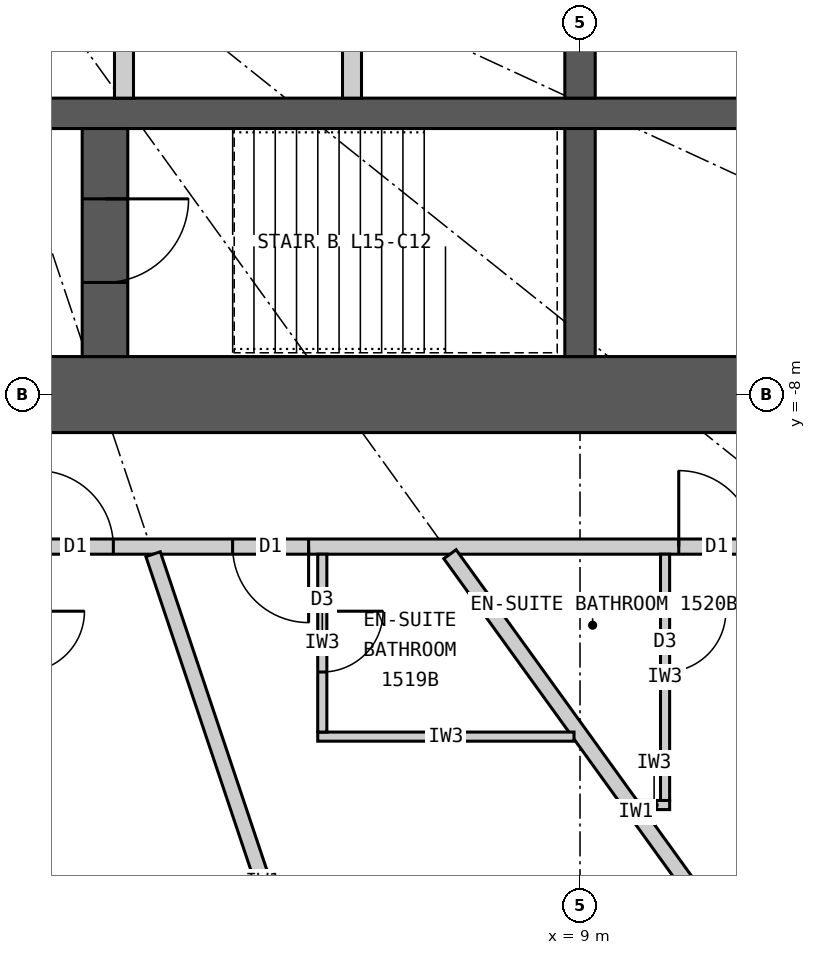
"""IFC4 building model, lengths in metres.
Left out: names, types, materials, properties, quantities, classifications, styles, units other than length and angle.
Written with IfcOpenShell. Run it as: python <this file> out.ifc"""

import sys

from ifc_helpers import new_model, si_unit, direction, frame, frame_2d, origin, place, context, subcontext, project, spatial, rectangle, extrude, element, fill, save


model = new_model("IFC4")
c1 = context("Model", 3, precision=1e-05, world=origin(), true_north=direction((0.0, 1.0)))
c2 = subcontext(c1, "Body", "Model", "MODEL_VIEW")
j1 = project(units=[si_unit("LENGTHUNIT", "METRE"), si_unit("PLANEANGLEUNIT", "RADIAN")], contexts=[c1])
p1 = place(None, origin())
s1 = spatial("IfcSite", under=j1, at=p1, CompositionType="ELEMENT")
p2 = place(p1, origin())
s2 = spatial("IfcBuilding", under=s1, at=p2, CompositionType="ELEMENT")
p3 = place(p2, frame((0.0, 0.0, 63.9)))
s3 = spatial("IfcBuildingStorey", under=s2, at=p3, CompositionType="ELEMENT", Elevation=63.9)
p4 = place(p3, frame((12.5, -8.0, 0.0), z_axis=(0.0, 0.0, 1.0), x_axis=(-1.0, 0.0, 0.0)))
e1 = element("IfcWall", 1, at=p4, inside=s3, PredefinedType="SHEAR", context=c2, shape_type="SweptSolid", body=[
    extrude(rectangle(XDim=25.0, YDim=1.0, at=frame_2d((12.5, 0.0))), origin(), (0.0, 0.0, 1.0), 3.3),
])
p5 = place(p4, frame((11.2, 0.0, 0.0)))
e2 = element("IfcOpeningElement", 2, at=p5, cuts=e1, PredefinedType="OPENING", context=c2, shape_type="SweptSolid", body=[
    extrude(rectangle(XDim=1.2, YDim=2.2, at=frame_2d((0.6, 1.1))), frame((0.0, 0.51, 0.0), z_axis=(0.0, -1.0, 0.0), x_axis=(1.0, 0.0, 0.0)), (0.0, 0.0, 1.0), 1.02),
])
p6 = place(p4, frame((18.8, 0.0, 0.0)))
e3 = element("IfcOpeningElement", 3, at=p6, cuts=e1, PredefinedType="OPENING", context=c2, shape_type="SweptSolid", body=[
    extrude(rectangle(XDim=0.9, YDim=2.2, at=frame_2d((0.45, 1.1))), frame((0.0, 0.51, 0.0), z_axis=(0.0, -1.0, 0.0), x_axis=(1.0, 0.0, 0.0)), (0.0, 0.0, 1.0), 1.02),
])
p7 = place(p3, frame((-11.5, -4.3, 0.0), z_axis=(0.0, 0.0, 1.0), x_axis=(1.0, 0.0, 0.0)))
e4 = element("IfcWall", 4, at=p7, inside=s3, PredefinedType="SHEAR", context=c2, shape_type="SweptSolid", body=[
    extrude(rectangle(XDim=23.0, YDim=0.4, at=frame_2d((11.5, 0.0))), origin(), (0.0, 0.0, 1.0), 3.3),
])
p8 = place(p3, frame((9.0, -4.1, 0.0), z_axis=(0.0, 0.0, 1.0), x_axis=(0.0, 1.0, 0.0)))
e5 = element("IfcWall", 5, at=p8, inside=s3, PredefinedType="SHEAR", context=c2, shape_type="SweptSolid", body=[
    extrude(rectangle(XDim=2.35, YDim=0.4, at=frame_2d((1.175, 0.0))), origin(), (0.0, 0.0, 1.0), 3.3),
])
p9 = place(p3, frame((9.0, -7.5, 0.0), z_axis=(0.0, 0.0, 1.0), x_axis=(0.0, 1.0, 0.0)))
e6 = element("IfcWall", 6, at=p9, inside=s3, PredefinedType="SHEAR", context=c2, shape_type="SweptSolid", body=[
    extrude(rectangle(XDim=3.0, YDim=0.4, at=frame_2d((1.5, 0.0))), origin(), (0.0, 0.0, 1.0), 3.3),
])
p10 = place(p3, frame((2.75, -7.5, 0.0), z_axis=(0.0, 0.0, 1.0), x_axis=(0.0, 1.0, 0.0)))
e7 = element("IfcWall", 7, at=p10, inside=s3, PredefinedType="SHEAR", context=c2, shape_type="SweptSolid", body=[
    extrude(rectangle(XDim=3.0, YDim=0.6, at=frame_2d((1.5, 0.0))), origin(), (0.0, 0.0, 1.0), 3.3),
])
p11 = place(p10, frame((0.975, 0.0, 0.0)))
e8 = element("IfcOpeningElement", 8, at=p11, cuts=e7, PredefinedType="OPENING", context=c2, shape_type="SweptSolid", body=[
    extrude(rectangle(XDim=1.1, YDim=2.2, at=frame_2d((0.55, 1.1))), frame((0.0, 0.31, 0.0), z_axis=(0.0, -1.0, 0.0), x_axis=(1.0, 0.0, 0.0)), (0.0, 0.0, 1.0), 0.62),
])
for number, where, z_axis, x_axis in (
    (9, (3.0, -4.1, 0.0), (0.0, 0.0, 1.0), (0.0, 1.0, 0.0)),
    (10, (6.0, -4.1, 0.0), (0.0, 0.0, 1.0), (0.0, 1.0, 0.0)),
):
    element("IfcWall", number, at=place(p3, frame(where, z_axis=z_axis, x_axis=x_axis)), inside=s3, PredefinedType="PARTITIONING", context=c2, shape_type="SweptSolid", body=[
        extrude(rectangle(XDim=2.35, YDim=0.25, at=frame_2d((1.175, 0.0))), origin(), (0.0, 0.0, 1.0), 3.3),
    ])
p12 = place(p3, frame((14.1, -10.0, 0.0), z_axis=(0.0, 0.0, 1.0), x_axis=(-1.0, 0.0, 0.0)))
e11 = element("IfcWall", 11, at=p12, inside=s3, PredefinedType="PARTITIONING", context=c2, shape_type="SweptSolid", body=[
    extrude(rectangle(XDim=28.2, YDim=0.2, at=frame_2d((14.1, 0.0))), origin(), (0.0, 0.0, 1.0), 3.12),
])
p13 = place(p12, frame((23.865, 0.0, 0.0)))
e12 = element("IfcOpeningElement", 12, at=p13, cuts=e11, PredefinedType="OPENING", context=c2, shape_type="SweptSolid", body=[
    extrude(rectangle(XDim=1.0, YDim=2.2, at=frame_2d((0.5, 1.1))), frame((0.0, 0.11, 0.0), z_axis=(0.0, -1.0, 0.0), x_axis=(1.0, 0.0, 0.0)), (0.0, 0.0, 1.0), 0.22),
])
p14 = place(p12, frame((18.529, 0.0, 0.0)))
e13 = element("IfcOpeningElement", 13, at=p14, cuts=e11, PredefinedType="OPENING", context=c2, shape_type="SweptSolid", body=[
    extrude(rectangle(XDim=1.0, YDim=2.2, at=frame_2d((0.5, 1.1))), frame((0.0, 0.11, 0.0), z_axis=(0.0, -1.0, 0.0), x_axis=(1.0, 0.0, 0.0)), (0.0, 0.0, 1.0), 0.22),
])
p15 = place(p12, frame((14.623, 0.0, 0.0)))
e14 = element("IfcOpeningElement", 14, at=p15, cuts=e11, PredefinedType="OPENING", context=c2, shape_type="SweptSolid", body=[
    extrude(rectangle(XDim=1.0, YDim=2.2, at=frame_2d((0.5, 1.1))), frame((0.0, 0.11, 0.0), z_axis=(0.0, -1.0, 0.0), x_axis=(1.0, 0.0, 0.0)), (0.0, 0.0, 1.0), 0.22),
])
p16 = place(p12, frame((11.24, 0.0, 0.0)))
e15 = element("IfcOpeningElement", 15, at=p16, cuts=e11, PredefinedType="OPENING", context=c2, shape_type="SweptSolid", body=[
    extrude(rectangle(XDim=1.0, YDim=2.2, at=frame_2d((0.5, 1.1))), frame((0.0, 0.11, 0.0), z_axis=(0.0, -1.0, 0.0), x_axis=(1.0, 0.0, 0.0)), (0.0, 0.0, 1.0), 0.22),
])
p17 = place(p12, frame((8.671, 0.0, 0.0)))
e16 = element("IfcOpeningElement", 16, at=p17, cuts=e11, PredefinedType="OPENING", context=c2, shape_type="SweptSolid", body=[
    extrude(rectangle(XDim=1.0, YDim=2.2, at=frame_2d((0.5, 1.1))), frame((0.0, 0.11, 0.0), z_axis=(0.0, -1.0, 0.0), x_axis=(1.0, 0.0, 0.0)), (0.0, 0.0, 1.0), 0.22),
])
p18 = place(p12, frame((2.801, 0.0, 0.0)))
e17 = element("IfcOpeningElement", 17, at=p18, cuts=e11, PredefinedType="OPENING", context=c2, shape_type="SweptSolid", body=[
    extrude(rectangle(XDim=1.0, YDim=2.2, at=frame_2d((0.5, 1.1))), frame((0.0, 0.11, 0.0), z_axis=(0.0, -1.0, 0.0), x_axis=(1.0, 0.0, 0.0)), (0.0, 0.0, 1.0), 0.22),
])
p19 = place(p3, frame((3.383, -10.1, 0.0), z_axis=(0.0, 0.0, 1.0), x_axis=(0.31759592231, -0.948226149256, 0.0)))
e18 = element("IfcWall", 18, at=p19, inside=s3, PredefinedType="PARTITIONING", context=c2, shape_type="SweptSolid", body=[
    extrude(rectangle(XDim=9.098, YDim=0.2, at=frame_2d((4.549, 0.0))), origin(), (0.0, 0.0, 1.0), 2.32),
])
p20 = place(p3, frame((7.289, -10.1, 0.0), z_axis=(0.0, 0.0, 1.0), x_axis=(0.585198353053, -0.810890182197, 0.0)))
e19 = element("IfcWall", 19, at=p20, inside=s3, PredefinedType="PARTITIONING", context=c2, shape_type="SweptSolid", body=[
    extrude(rectangle(XDim=8.36, YDim=0.2, at=frame_2d((4.18, 0.0))), origin(), (0.0, 0.0, 1.0), 2.32),
])
p21 = place(p3, frame((8.921, -12.5, 0.0), z_axis=(0.0, 0.0, 1.0), x_axis=(-1.0, 0.0, 0.0)))
e20 = element("IfcWall", 20, at=p21, inside=s3, PredefinedType="PARTITIONING", context=c2, shape_type="SweptSolid", body=[
    extrude(rectangle(XDim=3.372, YDim=0.12, at=frame_2d((1.686, 0.0))), origin(), (0.0, 0.0, 1.0), 3.12),
])
p22 = place(p3, frame((5.609, -10.1, 0.0), z_axis=(0.0, 0.0, 1.0), x_axis=(0.0, -1.0, 0.0)))
e21 = element("IfcWall", 21, at=p22, inside=s3, PredefinedType="PARTITIONING", context=c2, shape_type="SweptSolid", body=[
    extrude(rectangle(XDim=2.34, YDim=0.12, at=frame_2d((1.17, 0.0))), origin(), (0.0, 0.0, 1.0), 3.12),
])
p23 = place(p22, frame((0.75, 0.0, 0.0)))
e22 = element("IfcOpeningElement", 22, at=p23, cuts=e21, PredefinedType="OPENING", context=c2, shape_type="SweptSolid", body=[
    extrude(rectangle(XDim=0.8, YDim=2.1, at=frame_2d((0.4, 1.05))), frame((0.0, 0.07, 0.0), z_axis=(0.0, -1.0, 0.0), x_axis=(1.0, 0.0, 0.0)), (0.0, 0.0, 1.0), 0.14),
])
p24 = place(p3, frame((9.771, -13.4, 0.0), z_axis=(0.0, 0.0, 1.0), x_axis=(1.0, 0.0, 0.0)))
e23 = element("IfcWall", 23, at=p24, inside=s3, PredefinedType="PARTITIONING", context=c2, shape_type="SweptSolid", body=[
    extrude(rectangle(XDim=0.408, YDim=0.12, at=frame_2d((0.204, 0.0))), origin(), (0.0, 0.0, 1.0), 3.12),
])
p25 = place(p3, frame((10.119, -10.1, 0.0), z_axis=(0.0, 0.0, 1.0), x_axis=(0.0, -1.0, 0.0)))
e24 = element("IfcWall", 24, at=p25, inside=s3, PredefinedType="PARTITIONING", context=c2, shape_type="SweptSolid", body=[
    extrude(rectangle(XDim=3.24, YDim=0.12, at=frame_2d((1.62, 0.0))), origin(), (0.0, 0.0, 1.0), 3.12),
])
p26 = place(p25, frame((0.75, 0.0, 0.0)))
e25 = element("IfcOpeningElement", 25, at=p26, cuts=e24, PredefinedType="OPENING", context=c2, shape_type="SweptSolid", body=[
    extrude(rectangle(XDim=0.8, YDim=2.1, at=frame_2d((0.4, 1.05))), frame((0.0, 0.07, 0.0), z_axis=(0.0, -1.0, 0.0), x_axis=(1.0, 0.0, 0.0)), (0.0, 0.0, 1.0), 0.14),
])
p27 = place(p16, origin())
e26 = element("IfcDoor", 26, at=p27, inside=s3, OperationType="SINGLE_SWING_RIGHT", PredefinedType="DOOR", context=c2, shape_type="SweptSolid", body=[
    extrude(rectangle(XDim=1.0, YDim=2.2, at=frame_2d((0.5, 1.1))), frame((0.0, 0.025, 0.0), z_axis=(0.0, -1.0, 0.0), x_axis=(1.0, 0.0, 0.0)), (0.0, 0.0, 1.0), 0.05),
])
fill(e15, e26)
p28 = place(p23, origin())
e27 = element("IfcDoor", 27, at=p28, inside=s3, OperationType="SINGLE_SWING_LEFT", PredefinedType="DOOR", context=c2, shape_type="SweptSolid", body=[
    extrude(rectangle(XDim=0.8, YDim=2.1, at=frame_2d((0.4, 1.05))), frame((0.0, 0.025, 0.0), z_axis=(0.0, -1.0, 0.0), x_axis=(1.0, 0.0, 0.0)), (0.0, 0.0, 1.0), 0.05),
])
fill(e22, e27)
p29 = place(p17, origin())
e28 = element("IfcDoor", 28, at=p29, inside=s3, OperationType="SINGLE_SWING_LEFT", PredefinedType="DOOR", context=c2, shape_type="SweptSolid", body=[
    extrude(rectangle(XDim=1.0, YDim=2.2, at=frame_2d((0.5, 1.1))), frame((0.0, 0.025, 0.0), z_axis=(0.0, -1.0, 0.0), x_axis=(1.0, 0.0, 0.0)), (0.0, 0.0, 1.0), 0.05),
])
fill(e16, e28)
p30 = place(p26, origin())
e29 = element("IfcDoor", 29, at=p30, inside=s3, OperationType="SINGLE_SWING_LEFT", PredefinedType="DOOR", context=c2, shape_type="SweptSolid", body=[
    extrude(rectangle(XDim=0.8, YDim=2.1, at=frame_2d((0.4, 1.05))), frame((0.0, 0.025, 0.0), z_axis=(0.0, -1.0, 0.0), x_axis=(1.0, 0.0, 0.0)), (0.0, 0.0, 1.0), 0.05),
])
fill(e25, e29)
p31 = place(p18, origin())
e30 = element("IfcDoor", 30, at=p31, inside=s3, OperationType="SINGLE_SWING_RIGHT", PredefinedType="DOOR", context=c2, shape_type="SweptSolid", body=[
    extrude(rectangle(XDim=1.0, YDim=2.2, at=frame_2d((0.5, 1.1))), frame((0.0, 0.025, 0.0), z_axis=(0.0, -1.0, 0.0), x_axis=(1.0, 0.0, 0.0)), (0.0, 0.0, 1.0), 0.05),
])
fill(e17, e30)
p32 = place(p11, origin())
e31 = element("IfcDoor", 31, at=p32, inside=s3, OperationType="SINGLE_SWING_RIGHT", PredefinedType="DOOR", context=c2, shape_type="SweptSolid", body=[
    extrude(rectangle(XDim=1.1, YDim=2.2, at=frame_2d((0.55, 1.1))), frame((0.0, 0.025, 0.0), z_axis=(0.0, -1.0, 0.0), x_axis=(1.0, 0.0, 0.0)), (0.0, 0.0, 1.0), 0.05),
])
fill(e8, e31)
save(model, sys.argv[1])
